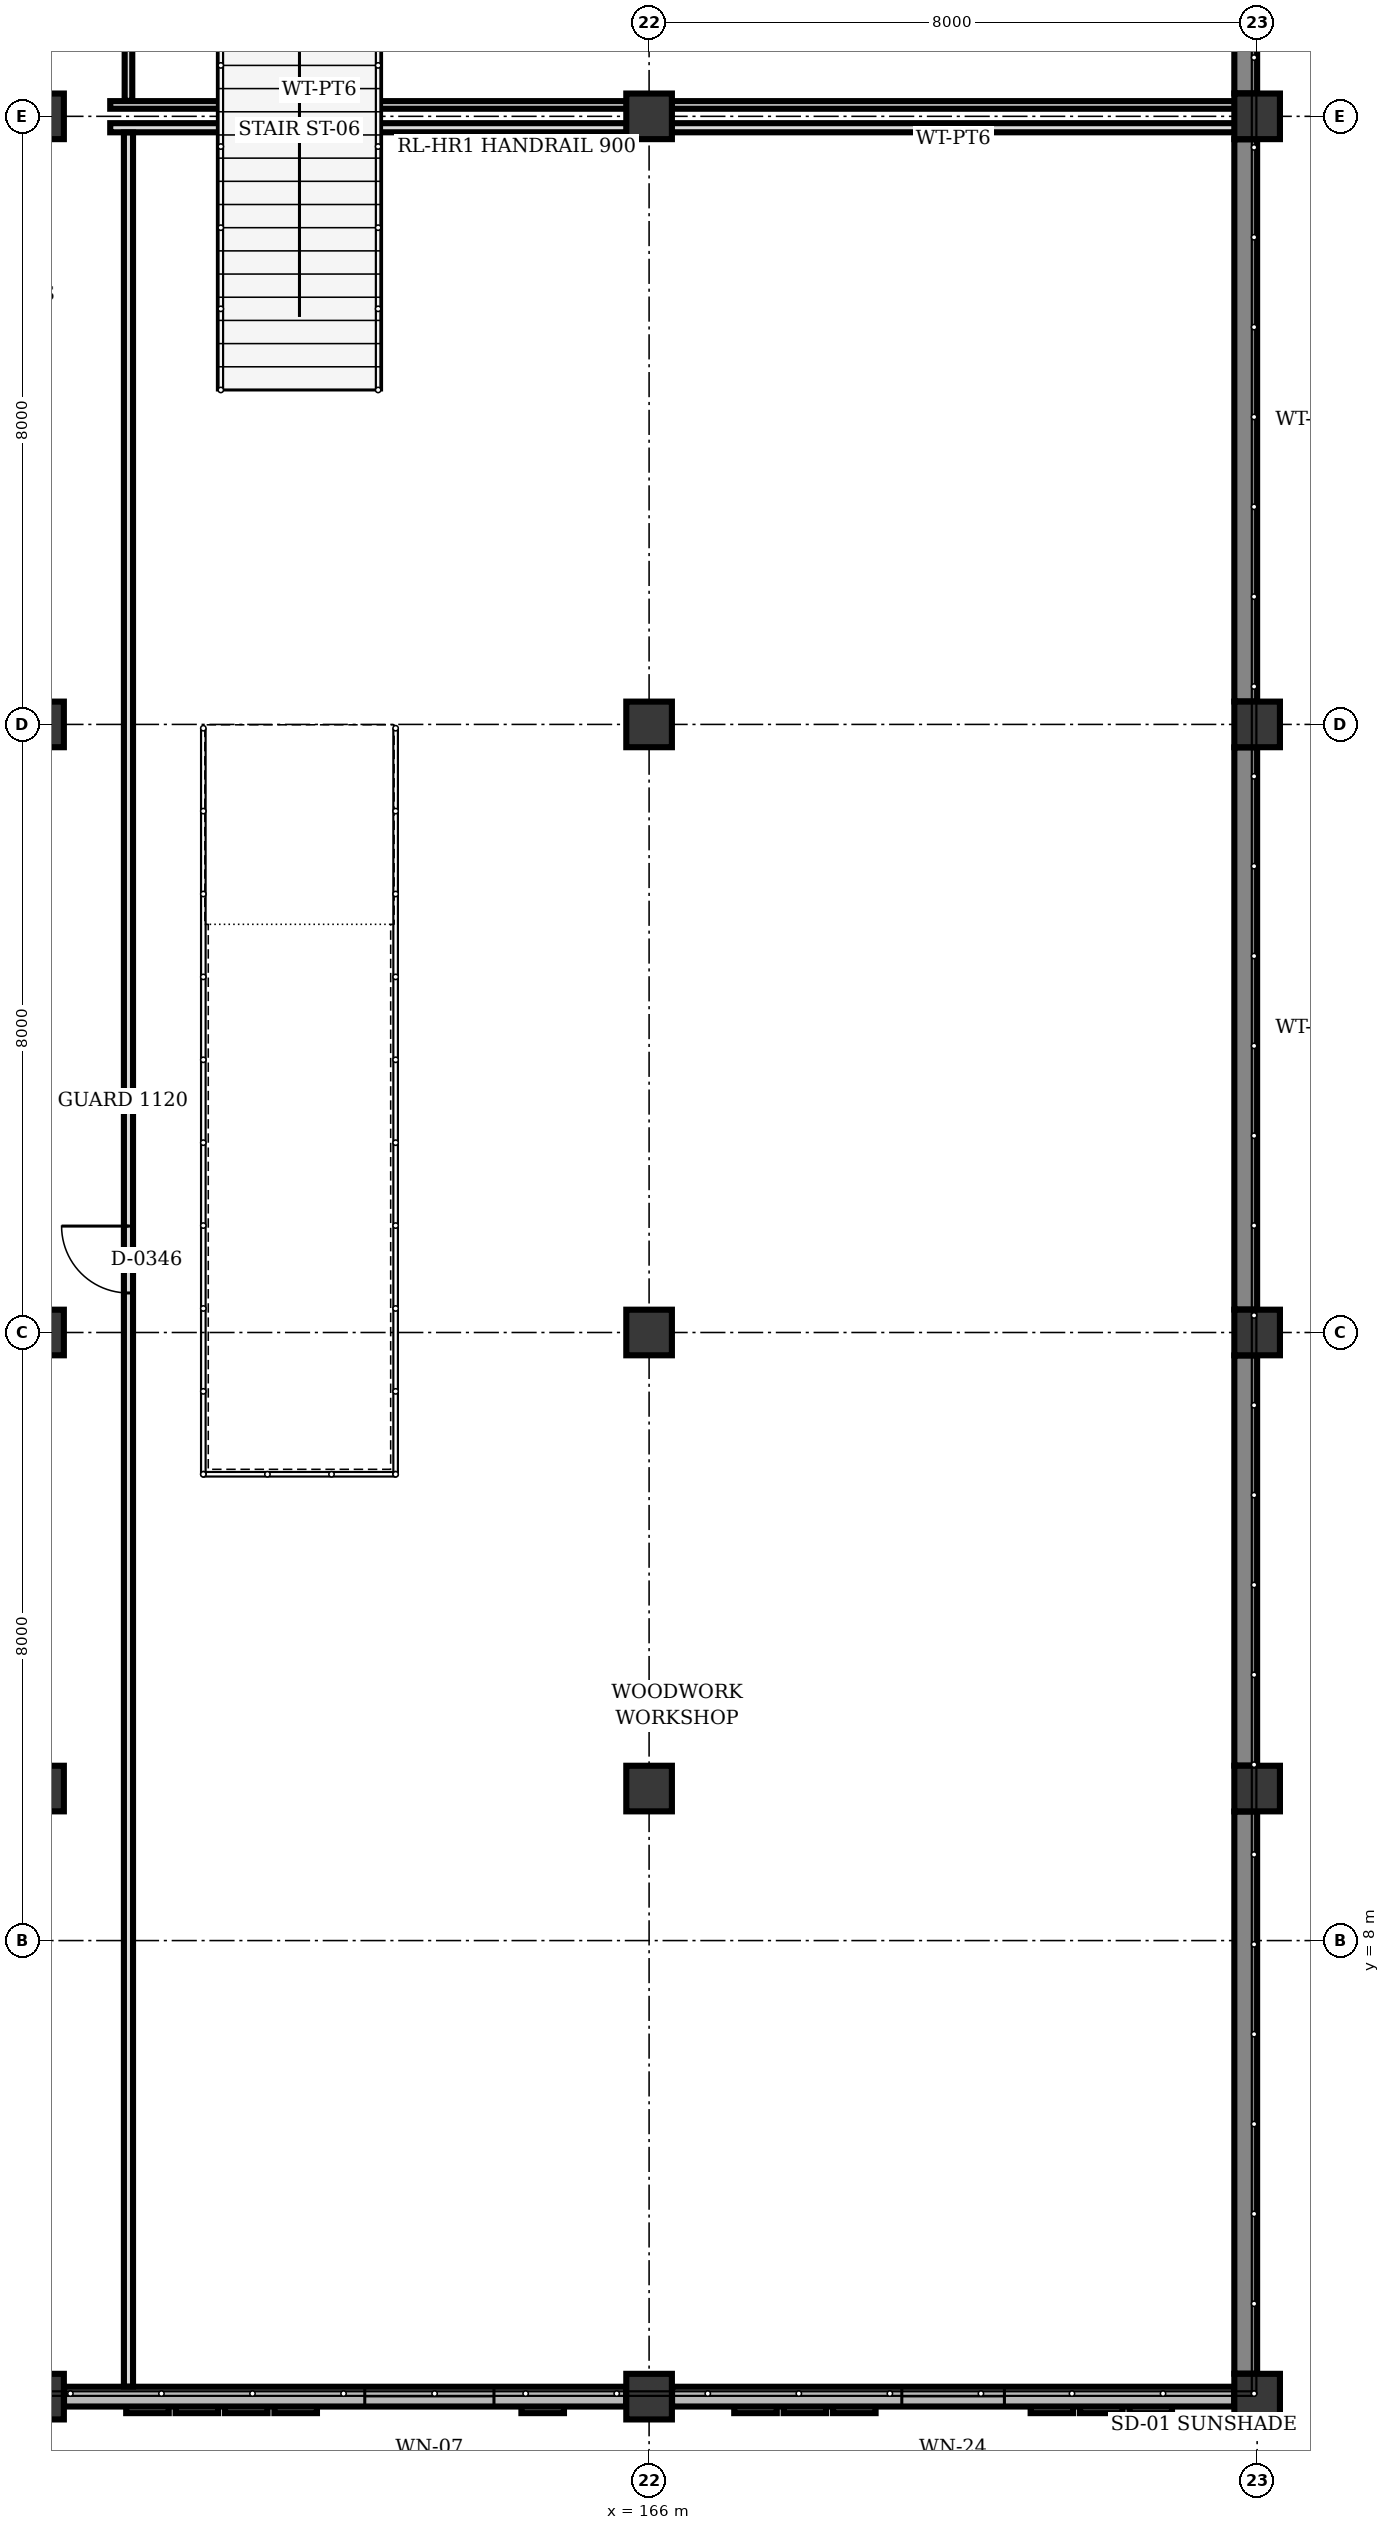
"""IFC4 building model, lengths in metres.
Left out: names, types, materials, properties, quantities, classifications, styles, units other than length and angle.
Written with IfcOpenShell. Run it as: python <this file> out.ifc"""

import sys

from ifc_helpers import new_model, si_unit, direction, frame, frame_2d, origin, origin_2d, place, context, subcontext, project, spatial, rectangle, extrude, element, fill, save


model = new_model("IFC4")
c1 = context("Model", 3, precision=1e-05, world=origin(), true_north=direction((0.0, 1.0)))
c2 = subcontext(c1, "Body", "Model", "MODEL_VIEW")
j1 = project(units=[si_unit("LENGTHUNIT", "METRE"), si_unit("PLANEANGLEUNIT", "RADIAN")], contexts=[c1])
p1 = place(None, origin())
s1 = spatial("IfcSite", under=j1, at=p1, CompositionType="ELEMENT")
p2 = place(p1, origin())
s2 = spatial("IfcBuilding", under=s1, at=p2, CompositionType="ELEMENT")
p3 = place(p2, frame((0.0, 0.0, 4.5)))
s3 = spatial("IfcBuildingStorey", under=s2, at=p3, CompositionType="ELEMENT", Elevation=4.5)
for number, where, z_axis, x_axis in (
    (1, (158.0, 10.0, 0.0), (0.0, 0.0, 1.0), (1.0, 0.0, 0.0)),
    (2, (158.0, 16.0, 0.0), (0.0, 0.0, 1.0), (1.0, 0.0, 0.0)),
    (3, (158.0, 2.0, 0.0), (0.0, 0.0, 1.0), (1.0, 0.0, 0.0)),
    (4, (158.0, 24.0, 0.0), (0.0, 0.0, 1.0), (1.0, 0.0, 0.0)),
    (5, (158.0, 32.0, 0.0), (0.0, 0.0, 1.0), (1.0, 0.0, 0.0)),
    (6, (166.0, 10.0, 0.0), (0.0, 0.0, 1.0), (1.0, 0.0, 0.0)),
    (7, (166.0, 16.0, 0.0), (0.0, 0.0, 1.0), (1.0, 0.0, 0.0)),
    (8, (166.0, 2.0, 0.0), (0.0, 0.0, 1.0), (1.0, 0.0, 0.0)),
    (9, (166.0, 24.0, 0.0), (0.0, 0.0, 1.0), (1.0, 0.0, 0.0)),
    (10, (166.0, 32.0, 0.0), (0.0, 0.0, 1.0), (1.0, 0.0, 0.0)),
    (11, (174.0, 10.0, 0.0), (0.0, 0.0, 1.0), (1.0, 0.0, 0.0)),
    (12, (174.0, 16.0, 0.0), (0.0, 0.0, 1.0), (1.0, 0.0, 0.0)),
    (13, (174.0, 2.0, 0.0), (0.0, 0.0, 1.0), (1.0, 0.0, 0.0)),
    (14, (174.0, 24.0, 0.0), (0.0, 0.0, 1.0), (1.0, 0.0, 0.0)),
    (15, (174.0, 32.0, 0.0), (0.0, 0.0, 1.0), (1.0, 0.0, 0.0)),
):
    element("IfcColumn", number, at=place(p3, frame(where, z_axis=z_axis, x_axis=x_axis)), inside=s3, PredefinedType="COLUMN", context=c2, shape_type="SweptSolid", body=[
        extrude(rectangle(XDim=0.6, YDim=0.6, at=origin_2d()), origin(), (0.0, 0.0, 1.0), 4.0),
    ])
for number, where, z_axis, x_axis in (
    (16, (173.85, 39.698, 0.0), (0.0, 0.0, 1.0), (0.0, -1.0, 0.0)),
    (17, (173.85, 31.698, 0.0), (0.0, 0.0, 1.0), (0.0, -1.0, 0.0)),
    (18, (173.85, 23.698, 0.0), (0.0, 0.0, 1.0), (0.0, -1.0, 0.0)),
):
    element("IfcWall", number, at=place(p3, frame(where, z_axis=z_axis, x_axis=x_axis)), inside=s3, PredefinedType="SHEAR", context=c2, shape_type="SweptSolid", body=[
        extrude(rectangle(XDim=7.396, YDim=0.3, at=frame_2d((3.698, 0.0))), origin(), (0.0, 0.0, 1.0), 3.052),
    ])
p4 = place(p3, frame((173.85, 15.698, 0.0), z_axis=(0.0, 0.0, 1.0), x_axis=(0.0, -1.0, 0.0)))
e19 = element("IfcWall", 19, at=p4, inside=s3, PredefinedType="SHEAR", context=c2, shape_type="SweptSolid", body=[
    extrude(rectangle(XDim=5.396, YDim=0.3, at=frame_2d((2.698, 0.0))), origin(), (0.0, 0.0, 1.0), 3.052),
])
p5 = place(p3, frame((173.85, 9.698, 0.0), z_axis=(0.0, 0.0, 1.0), x_axis=(0.0, -1.0, 0.0)))
e20 = element("IfcWall", 20, at=p5, inside=s3, PredefinedType="SHEAR", context=c2, shape_type="SweptSolid", body=[
    extrude(rectangle(XDim=7.396, YDim=0.3, at=frame_2d((3.698, 0.0))), origin(), (0.0, 0.0, 1.0), 3.052),
])
p6 = place(p3, frame((173.698, 2.0, 0.0), z_axis=(0.0, 0.0, 1.0), x_axis=(-1.0, 0.0, 0.0)))
e21 = element("IfcWall", 21, at=p6, inside=s3, PredefinedType="SOLIDWALL", context=c2, shape_type="SweptSolid", body=[
    extrude(rectangle(XDim=7.396, YDim=0.26, at=frame_2d((3.698, 0.0))), origin(), (0.0, 0.0, 1.0), 3.052),
])
p7 = place(p6, frame((3.023, 0.0, 0.9)))
e22 = element("IfcOpeningElement", 22, at=p7, cuts=e21, PredefinedType="OPENING", context=c2, shape_type="SweptSolid", body=[
    extrude(rectangle(XDim=1.35, YDim=1.4, at=frame_2d((0.675, 0.7))), frame((0.0, 0.14, 0.0), z_axis=(0.0, -1.0, 0.0), x_axis=(1.0, 0.0, 0.0)), (0.0, 0.0, 1.0), 0.28),
])
p8 = place(p3, frame((165.698, 2.0, 0.0), z_axis=(0.0, 0.0, 1.0), x_axis=(-1.0, 0.0, 0.0)))
e23 = element("IfcWall", 23, at=p8, inside=s3, PredefinedType="SOLIDWALL", context=c2, shape_type="SweptSolid", body=[
    extrude(rectangle(XDim=7.396, YDim=0.26, at=frame_2d((3.698, 0.0))), origin(), (0.0, 0.0, 1.0), 3.052),
])
p9 = place(p8, frame((1.739, 0.0, 0.9)))
e24 = element("IfcOpeningElement", 24, at=p9, cuts=e23, PredefinedType="OPENING", context=c2, shape_type="SweptSolid", body=[
    extrude(rectangle(XDim=1.7, YDim=1.1, at=frame_2d((0.85, 0.55))), frame((0.0, 0.14, 0.0), z_axis=(0.0, -1.0, 0.0), x_axis=(1.0, 0.0, 0.0)), (0.0, 0.0, 1.0), 0.28),
])
p10 = place(p3, frame((158.91, 31.85, 0.0), z_axis=(0.0, 0.0, 1.0), x_axis=(1.0, 0.0, 0.0)))
e25 = element("IfcWall", 25, at=p10, inside=s3, PredefinedType="PARTITIONING", context=c2, shape_type="SweptSolid", body=[
    extrude(rectangle(XDim=6.798, YDim=0.12, at=frame_2d((3.399, 0.0))), origin(), (0.0, 0.0, 1.0), 3.152),
])
p11 = place(p3, frame((166.292, 31.85, 0.0), z_axis=(0.0, 0.0, 1.0), x_axis=(1.0, 0.0, 0.0)))
e26 = element("IfcWall", 26, at=p11, inside=s3, PredefinedType="PARTITIONING", context=c2, shape_type="SweptSolid", body=[
    extrude(rectangle(XDim=7.416, YDim=0.12, at=frame_2d((3.708, 0.0))), origin(), (0.0, 0.0, 1.0), 3.052),
])
p12 = place(p3, frame((159.15, 2.133, 0.0), z_axis=(0.0, 0.0, 1.0), x_axis=(0.0, 1.0, 0.0)))
e27 = element("IfcWall", 27, at=p12, inside=s3, PredefinedType="PARTITIONING", context=c2, shape_type="SweptSolid", body=[
    extrude(rectangle(XDim=29.654, YDim=0.12, at=frame_2d((14.827, 0.0))), origin(), (0.0, 0.0, 1.0), 3.052),
])
p13 = place(p12, frame((14.387, 0.0, 0.0)))
e28 = element("IfcOpeningElement", 28, at=p13, cuts=e27, PredefinedType="OPENING", context=c2, shape_type="SweptSolid", body=[
    extrude(rectangle(XDim=0.88, YDim=2.1, at=frame_2d((0.44, 1.05))), frame((0.0, 0.07, 0.0), z_axis=(0.0, -1.0, 0.0), x_axis=(1.0, 0.0, 0.0)), (0.0, 0.0, 1.0), 0.14),
])
p14 = place(p3, frame((173.708, 32.15, 0.0), z_axis=(0.0, 0.0, 1.0), x_axis=(-1.0, 0.0, 0.0)))
e29 = element("IfcWall", 29, at=p14, inside=s3, PredefinedType="PARTITIONING", context=c2, shape_type="SweptSolid", body=[
    extrude(rectangle(XDim=7.416, YDim=0.1, at=frame_2d((3.708, 0.0))), origin(), (0.0, 0.0, 1.0), 3.052),
])
p15 = place(p3, frame((165.708, 32.15, 0.0), z_axis=(0.0, 0.0, 1.0), x_axis=(-1.0, 0.0, 0.0)))
e30 = element("IfcWall", 30, at=p15, inside=s3, PredefinedType="PARTITIONING", context=c2, shape_type="SweptSolid", body=[
    extrude(rectangle(XDim=6.798, YDim=0.1, at=frame_2d((3.399, 0.0))), origin(), (0.0, 0.0, 1.0), 3.152),
])
p16 = place(p3, frame((159.15, 32.203, 0.0), z_axis=(0.0, 0.0, 1.0), x_axis=(0.0, 1.0, 0.0)))
e31 = element("IfcWall", 31, at=p16, inside=s3, PredefinedType="PARTITIONING", context=c2, shape_type="SweptSolid", body=[
    extrude(rectangle(XDim=27.664, YDim=0.1, at=frame_2d((13.832, 0.0))), origin(), (0.0, 0.0, 1.0), 3.052),
])
p17 = place(p16, frame((13.392, 0.0, 0.0)))
e32 = element("IfcOpeningElement", 32, at=p17, cuts=e31, PredefinedType="OPENING", context=c2, shape_type="SweptSolid", body=[
    extrude(rectangle(XDim=0.88, YDim=2.1, at=frame_2d((0.44, 1.05))), frame((0.0, 0.06, 0.0), z_axis=(0.0, -1.0, 0.0), x_axis=(1.0, 0.0, 0.0)), (0.0, 0.0, 1.0), 0.12),
])
p18 = place(p7, origin())
e33 = element("IfcWindow", 33, at=p18, inside=s3, PartitioningType="SINGLE_PANEL", PredefinedType="WINDOW", context=c2, shape_type="SweptSolid", body=[
    extrude(rectangle(XDim=1.35, YDim=1.4, at=frame_2d((0.675, 0.7))), frame((0.0, 0.03, 0.0), z_axis=(0.0, -1.0, 0.0), x_axis=(1.0, 0.0, 0.0)), (0.0, 0.0, 1.0), 0.06),
])
fill(e22, e33)
p19 = place(p9, origin())
e34 = element("IfcWindow", 34, at=p19, inside=s3, PartitioningType="SINGLE_PANEL", PredefinedType="WINDOW", context=c2, shape_type="SweptSolid", body=[
    extrude(rectangle(XDim=1.7, YDim=1.1, at=frame_2d((0.85, 0.55))), frame((0.0, 0.03, 0.0), z_axis=(0.0, -1.0, 0.0), x_axis=(1.0, 0.0, 0.0)), (0.0, 0.0, 1.0), 0.06),
])
fill(e24, e34)
p20 = place(p13, origin())
e35 = element("IfcDoor", 35, at=p20, inside=s3, OperationType="SINGLE_SWING_RIGHT", PredefinedType="DOOR", context=c2, shape_type="SweptSolid", body=[
    extrude(rectangle(XDim=0.88, YDim=2.1, at=frame_2d((0.44, 1.05))), frame((0.0, 0.025, 0.0), z_axis=(0.0, -1.0, 0.0), x_axis=(1.0, 0.0, 0.0)), (0.0, 0.0, 1.0), 0.05),
])
fill(e28, e35)
save(model, sys.argv[1])
